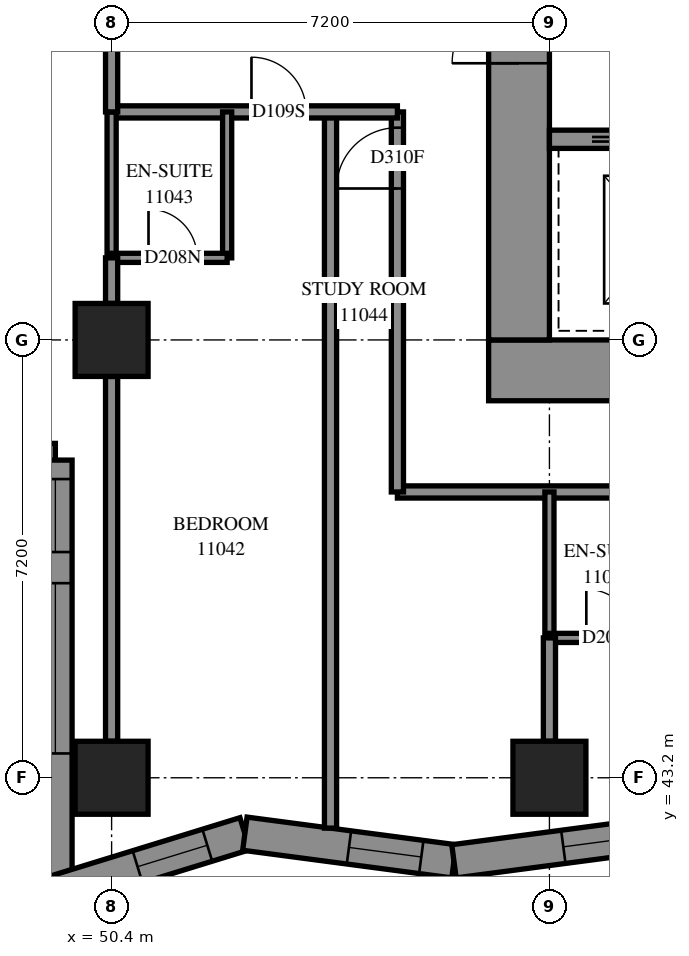
"""IFC4 building model, lengths in metres.
Left out: names, types, materials, properties, quantities, classifications, styles, units other than length and angle.
Written with IfcOpenShell. Run it as: python <this file> out.ifc"""

import sys

from ifc_helpers import new_model, si_unit, direction, frame, frame_2d, origin, origin_2d, place, context, subcontext, project, spatial, polyline, rectangle, outline, extrude, element, fill, save


model = new_model("IFC4")
c1 = context("Model", 3, precision=1e-05, world=origin(), true_north=direction((0.0, 1.0)))
c2 = subcontext(c1, "Body", "Model", "MODEL_VIEW")
j1 = project(units=[si_unit("LENGTHUNIT", "METRE"), si_unit("PLANEANGLEUNIT", "RADIAN")], contexts=[c1])
p1 = place(None, origin())
s1 = spatial("IfcSite", under=j1, at=p1, CompositionType="ELEMENT")
p2 = place(p1, origin())
s2 = spatial("IfcBuilding", under=s1, at=p2, CompositionType="ELEMENT")
p3 = place(p2, frame((0.0, 0.0, 44.0)))
s3 = spatial("IfcBuildingStorey", under=s2, at=p3, CompositionType="ELEMENT", Elevation=44.0)
for number, where, z_axis, x_axis in (
    (1, (50.4, 43.2, 0.0), (0.0, 0.0, 1.0), (1.0, 0.0, 0.0)),
    (2, (50.4, 50.4, 0.0), (0.0, 0.0, 1.0), (1.0, 0.0, 0.0)),
    (3, (57.6, 43.2, 0.0), (0.0, 0.0, 1.0), (1.0, 0.0, 0.0)),
):
    element("IfcColumn", number, at=place(p3, frame(where, z_axis=z_axis, x_axis=x_axis)), inside=s3, PredefinedType="COLUMN", context=c2, shape_type="SweptSolid", body=[
        extrude(rectangle(XDim=1.2, YDim=1.2, at=origin_2d()), origin(), (0.0, 0.0, 1.0), 3.1),
    ])
p4 = place(p3, frame((56.6, 49.9, -0.3), z_axis=(0.0, 0.0, 1.0), x_axis=(1.0, 0.0, 0.0)))
e4 = element("IfcWall", 4, at=p4, inside=s3, PredefinedType="SHEAR", context=c2, shape_type="SweptSolid", body=[
    extrude(rectangle(XDim=16.4, YDim=1.0, at=frame_2d((8.2, 0.0))), origin(), (0.0, 0.0, 1.0), 2.7),
])
p5 = place(p3, frame((57.1, 50.4, -0.3), z_axis=(0.0, 0.0, 1.0), x_axis=(0.0, 1.0, 0.0)))
e5 = element("IfcWall", 5, at=p5, inside=s3, PredefinedType="SHEAR", context=c2, shape_type="SweptSolid", body=[
    extrude(rectangle(XDim=14.4, YDim=1.0, at=frame_2d((7.2, 0.0))), origin(), (0.0, 0.0, 1.0), 2.7),
])
p6 = place(p5, frame((4.55, 0.0, 0.3)))
e6 = element("IfcOpeningElement", 6, at=p6, cuts=e5, PredefinedType="OPENING", context=c2, shape_type="SweptSolid", body=[
    extrude(rectangle(XDim=1.1, YDim=2.1, at=frame_2d((0.55, 1.05))), frame((0.0, 0.51, 0.0), z_axis=(0.0, -1.0, 0.0), x_axis=(1.0, 0.0, 0.0)), (0.0, 0.0, 1.0), 1.02),
])
p7 = place(p5, frame((11.35, 0.0, 0.3)))
e7 = element("IfcOpeningElement", 7, at=p7, cuts=e5, PredefinedType="OPENING", context=c2, shape_type="SweptSolid", body=[
    extrude(rectangle(XDim=1.1, YDim=2.1, at=frame_2d((0.55, 1.05))), frame((0.0, 0.51, 0.0), z_axis=(0.0, -1.0, 0.0), x_axis=(1.0, 0.0, 0.0)), (0.0, 0.0, 1.0), 1.02),
])
p8 = place(p3, frame((57.6, 53.7, 0.0), z_axis=(0.0, 0.0, 1.0), x_axis=(1.0, 0.0, 0.0)))
e8 = element("IfcWall", 8, at=p8, inside=s3, PredefinedType="SOLIDWALL", context=c2, shape_type="SweptSolid", body=[
    extrude(rectangle(XDim=14.4, YDim=0.3, at=frame_2d((7.2, 0.0))), origin(), (0.0, 0.0, 1.0), 3.1),
])
p9 = place(p8, frame((1.25, 0.0, 0.0)))
e9 = element("IfcOpeningElement", 9, at=p9, cuts=e8, PredefinedType="OPENING", context=c2, shape_type="SweptSolid", body=[
    extrude(rectangle(XDim=1.1, YDim=2.1, at=frame_2d((0.55, 1.05))), frame((0.0, 0.16, 0.0), z_axis=(0.0, -1.0, 0.0), x_axis=(1.0, 0.0, 0.0)), (0.0, 0.0, 1.0), 0.32),
])
p10 = place(p8, frame((4.85, 0.0, 0.0)))
e10 = element("IfcOpeningElement", 10, at=p10, cuts=e8, PredefinedType="OPENING", context=c2, shape_type="SweptSolid", body=[
    extrude(rectangle(XDim=1.1, YDim=2.1, at=frame_2d((0.55, 1.05))), frame((0.0, 0.16, 0.0), z_axis=(0.0, -1.0, 0.0), x_axis=(1.0, 0.0, 0.0)), (0.0, 0.0, 1.0), 0.32),
])
p11 = place(p8, frame((8.45, 0.0, 0.0)))
e11 = element("IfcOpeningElement", 11, at=p11, cuts=e8, PredefinedType="OPENING", context=c2, shape_type="SweptSolid", body=[
    extrude(rectangle(XDim=1.1, YDim=2.1, at=frame_2d((0.55, 1.05))), frame((0.0, 0.16, 0.0), z_axis=(0.0, -1.0, 0.0), x_axis=(1.0, 0.0, 0.0)), (0.0, 0.0, 1.0), 0.32),
])
p12 = place(p8, frame((12.05, 0.0, 0.0)))
e12 = element("IfcOpeningElement", 12, at=p12, cuts=e8, PredefinedType="OPENING", context=c2, shape_type="SweptSolid", body=[
    extrude(rectangle(XDim=1.1, YDim=2.1, at=frame_2d((0.55, 1.05))), frame((0.0, 0.16, 0.0), z_axis=(0.0, -1.0, 0.0), x_axis=(1.0, 0.0, 0.0)), (0.0, 0.0, 1.0), 0.32),
])
p13 = place(p3, frame((35.075, 48.424, 0.0), z_axis=(0.0, 0.0, 1.0), x_axis=(1.0, 0.0, 0.0)))
e13 = element("IfcWall", 13, at=p13, inside=s3, PredefinedType="SOLIDWALL", context=c2, shape_type="SweptSolid", body=[
    extrude(outline(polyline([(-0.275, -0.275), (14.125, -0.275), (14.675, 0.275), (0.275, 0.275), (-0.275, -0.275)])), origin(), (0.0, 0.0, 1.0), 3.1),
])
p14 = place(p13, frame((1.825, 0.0, 0.7)))
e14 = element("IfcOpeningElement", 14, at=p14, cuts=e13, PredefinedType="OPENING", context=c2, shape_type="SweptSolid", body=[
    extrude(rectangle(XDim=1.8, YDim=2.0, at=frame_2d((0.9, 1.0))), frame((0.0, 0.285, 0.0), z_axis=(0.0, -1.0, 0.0), x_axis=(1.0, 0.0, 0.0)), (0.0, 0.0, 1.0), 0.57),
])
p15 = place(p13, frame((5.425, 0.0, 0.7)))
e15 = element("IfcOpeningElement", 15, at=p15, cuts=e13, PredefinedType="OPENING", context=c2, shape_type="SweptSolid", body=[
    extrude(rectangle(XDim=1.8, YDim=2.0, at=frame_2d((0.9, 1.0))), frame((0.0, 0.285, 0.0), z_axis=(0.0, -1.0, 0.0), x_axis=(1.0, 0.0, 0.0)), (0.0, 0.0, 1.0), 0.57),
])
p16 = place(p13, frame((9.025, 0.0, 0.7)))
e16 = element("IfcOpeningElement", 16, at=p16, cuts=e13, PredefinedType="OPENING", context=c2, shape_type="SweptSolid", body=[
    extrude(rectangle(XDim=1.8, YDim=2.0, at=frame_2d((0.9, 1.0))), frame((0.0, 0.285, 0.0), z_axis=(0.0, -1.0, 0.0), x_axis=(1.0, 0.0, 0.0)), (0.0, 0.0, 1.0), 0.57),
])
p17 = place(p13, frame((12.062, 0.0, 0.7)))
e17 = element("IfcOpeningElement", 17, at=p17, cuts=e13, PredefinedType="OPENING", context=c2, shape_type="SweptSolid", body=[
    extrude(rectangle(XDim=1.8, YDim=2.0, at=frame_2d((0.9, 1.0))), frame((0.0, 0.285, 0.0), z_axis=(0.0, -1.0, 0.0), x_axis=(1.0, 0.0, 0.0)), (0.0, 0.0, 1.0), 0.57),
])
p18 = place(p3, frame((49.475, 48.424, 0.0), z_axis=(0.0, 0.0, 1.0), x_axis=(0.0, -1.0, 0.0)))
e18 = element("IfcWall", 18, at=p18, inside=s3, PredefinedType="SOLIDWALL", context=c2, shape_type="SweptSolid", body=[
    extrude(outline(polyline([(0.275, -0.275), (7.475, -0.275), (6.73, 0.275), (-0.275, 0.275), (0.275, -0.275)])), origin(), (0.0, 0.0, 1.0), 3.1),
])
p19 = place(p18, frame((2.024, 0.0, 0.5)))
e19 = element("IfcOpeningElement", 19, at=p19, cuts=e18, PredefinedType="OPENING", context=c2, shape_type="SweptSolid", body=[
    extrude(rectangle(XDim=2.8, YDim=2.45, at=frame_2d((1.4, 1.225))), frame((0.0, 0.285, 0.0), z_axis=(0.0, -1.0, 0.0), x_axis=(1.0, 0.0, 0.0)), (0.0, 0.0, 1.0), 0.57),
])
p20 = place(p18, frame((0.312, 0.0, 0.5)))
e20 = element("IfcOpeningElement", 20, at=p20, cuts=e18, PredefinedType="OPENING", context=c2, shape_type="SweptSolid", body=[
    extrude(rectangle(XDim=1.2, YDim=2.45, at=frame_2d((0.6, 1.225))), frame((0.0, 0.285, 0.0), z_axis=(0.0, -1.0, 0.0), x_axis=(1.0, 0.0, 0.0)), (0.0, 0.0, 1.0), 0.57),
])
p21 = place(p3, frame((49.475, 41.321, 0.0), z_axis=(0.0, 0.0, 1.0), x_axis=(0.9557664095, 0.2941267931, 0.0)))
e21 = element("IfcWall", 21, at=p21, inside=s3, PredefinedType="SOLIDWALL", context=c2, shape_type="SweptSolid", body=[
    extrude(outline(polyline([(-0.372, -0.275), (3.201, -0.275), (3.321, 0.275), (0.372, 0.275), (-0.372, -0.275)])), origin(), (0.0, 0.0, 1.0), 3.1),
])
p22 = place(p21, frame((1.414, 0.0, 0.5)))
e22 = element("IfcOpeningElement", 22, at=p22, cuts=e21, PredefinedType="OPENING", context=c2, shape_type="SweptSolid", body=[
    extrude(rectangle(XDim=1.2, YDim=2.45, at=frame_2d((0.6, 1.225))), frame((0.0, 0.285, 0.0), z_axis=(0.0, -1.0, 0.0), x_axis=(1.0, 0.0, 0.0)), (0.0, 0.0, 1.0), 0.57),
])
p23 = place(p3, frame((52.592, 42.281, 0.0), z_axis=(0.0, 0.0, 1.0), x_axis=(0.9913920636, -0.1309266064, 0.0)))
e23 = element("IfcWall", 23, at=p23, inside=s3, PredefinedType="SOLIDWALL", context=c2, shape_type="SweptSolid", body=[
    extrude(outline(polyline([(0.06, -0.275), (3.505, -0.275), (3.432, 0.275), (-0.06, 0.275), (0.06, -0.275)])), origin(), (0.0, 0.0, 1.0), 3.1),
])
p24 = place(p23, frame((1.726, 0.0, 0.5)))
e24 = element("IfcOpeningElement", 24, at=p24, cuts=e23, PredefinedType="OPENING", context=c2, shape_type="SweptSolid", body=[
    extrude(rectangle(XDim=1.2, YDim=2.45, at=frame_2d((0.6, 1.225))), frame((0.0, 0.285, 0.0), z_axis=(0.0, -1.0, 0.0), x_axis=(1.0, 0.0, 0.0)), (0.0, 0.0, 1.0), 0.57),
])
p25 = place(p3, frame((56.03, 41.826, 0.0), z_axis=(0.0, 0.0, 1.0), x_axis=(0.9913924297, 0.1309238341, 0.0)))
e25 = element("IfcWall", 25, at=p25, inside=s3, PredefinedType="SOLIDWALL", context=c2, shape_type="SweptSolid", body=[
    extrude(outline(polyline([(-0.036, -0.275), (3.408, -0.275), (3.481, 0.275), (0.036, 0.275), (-0.036, -0.275)])), origin(), (0.0, 0.0, 1.0), 3.1),
])
p26 = place(p25, frame((1.814, 0.0, 0.5)))
e26 = element("IfcOpeningElement", 26, at=p26, cuts=e25, PredefinedType="OPENING", context=c2, shape_type="SweptSolid", body=[
    extrude(rectangle(XDim=1.2, YDim=2.45, at=frame_2d((0.6, 1.225))), frame((0.0, 0.285, 0.0), z_axis=(0.0, -1.0, 0.0), x_axis=(1.0, 0.0, 0.0)), (0.0, 0.0, 1.0), 0.57),
])
p27 = place(p3, frame((55.1, 47.9, 0.0), z_axis=(0.0, 0.0, 1.0), x_axis=(1.0, 0.0, 0.0)))
e27 = element("IfcWall", 27, at=p27, inside=s3, PredefinedType="PARTITIONING", context=c2, shape_type="SweptSolid", body=[
    extrude(rectangle(XDim=19.204, YDim=0.2, at=frame_2d((9.602, 0.0))), origin(), (0.0, 0.0, 1.0), 3.1),
])
p28 = place(p27, frame((6.399, 0.0, 0.0)))
e28 = element("IfcOpeningElement", 28, at=p28, cuts=e27, PredefinedType="OPENING", context=c2, shape_type="SweptSolid", body=[
    extrude(rectangle(XDim=0.9, YDim=2.1, at=frame_2d((0.45, 1.05))), frame((0.0, 0.11, 0.0), z_axis=(0.0, -1.0, 0.0), x_axis=(1.0, 0.0, 0.0)), (0.0, 0.0, 1.0), 0.22),
])
p29 = place(p27, frame((13.599, 0.0, 0.0)))
e29 = element("IfcOpeningElement", 29, at=p29, cuts=e27, PredefinedType="OPENING", context=c2, shape_type="SweptSolid", body=[
    extrude(rectangle(XDim=0.9, YDim=2.1, at=frame_2d((0.45, 1.05))), frame((0.0, 0.11, 0.0), z_axis=(0.0, -1.0, 0.0), x_axis=(1.0, 0.0, 0.0)), (0.0, 0.0, 1.0), 0.22),
])
p30 = place(p3, frame((54.0, 42.372, 0.0), z_axis=(0.0, 0.0, 1.0), x_axis=(0.0, 1.0, 0.0)))
e30 = element("IfcWall", 30, at=p30, inside=s3, PredefinedType="PARTITIONING", context=c2, shape_type="SweptSolid", body=[
    extrude(rectangle(XDim=11.778, YDim=0.2, at=frame_2d((5.889, 0.0))), origin(), (0.0, 0.0, 1.0), 3.1),
])
p31 = place(p3, frame((55.1, 47.9, 0.0), z_axis=(0.0, 0.0, 1.0), x_axis=(0.0, 1.0, 0.0)))
e31 = element("IfcWall", 31, at=p31, inside=s3, PredefinedType="PARTITIONING", context=c2, shape_type="SweptSolid", body=[
    extrude(rectangle(XDim=6.25, YDim=0.2, at=frame_2d((3.125, 0.0))), origin(), (0.0, 0.0, 1.0), 3.1),
])
p32 = place(p31, frame((4.99, 0.0, 0.0)))
e32 = element("IfcOpeningElement", 32, at=p32, cuts=e31, PredefinedType="OPENING", context=c2, shape_type="SweptSolid", body=[
    extrude(rectangle(XDim=1.0, YDim=2.1, at=frame_2d((0.5, 1.05))), frame((0.0, 0.11, 0.0), z_axis=(0.0, -1.0, 0.0), x_axis=(1.0, 0.0, 0.0)), (0.0, 0.0, 1.0), 0.22),
])
p33 = place(p3, frame((50.4, 43.8, 0.0), z_axis=(0.0, 0.0, 1.0), x_axis=(0.0, 1.0, 0.0)))
e33 = element("IfcWall", 33, at=p33, inside=s3, PredefinedType="PARTITIONING", context=c2, shape_type="SweptSolid", body=[
    extrude(rectangle(XDim=6.0, YDim=0.2, at=frame_2d((3.0, 0.0))), origin(), (0.0, 0.0, 1.0), 2.6),
])
p34 = place(p3, frame((50.4, 54.15, 0.0), z_axis=(0.0, 0.0, 1.0), x_axis=(1.0, 0.0, 0.0)))
e34 = element("IfcWall", 34, at=p34, inside=s3, PredefinedType="PARTITIONING", context=c2, shape_type="SweptSolid", body=[
    extrude(rectangle(XDim=4.7, YDim=0.2, at=frame_2d((2.35, 0.0))), origin(), (0.0, 0.0, 1.0), 3.1),
])
p35 = place(p34, frame((2.3, 0.0, 0.0)))
e35 = element("IfcOpeningElement", 35, at=p35, cuts=e34, PredefinedType="OPENING", context=c2, shape_type="SweptSolid", body=[
    extrude(rectangle(XDim=0.9, YDim=2.1, at=frame_2d((0.45, 1.05))), frame((0.0, 0.11, 0.0), z_axis=(0.0, -1.0, 0.0), x_axis=(1.0, 0.0, 0.0)), (0.0, 0.0, 1.0), 0.22),
])
for number, where, z_axis, x_axis in (
    (36, (52.3, 51.75, 0.0), (0.0, 0.0, 1.0), (0.0, 1.0, 0.0)),
    (37, (50.4, 51.75, 0.0), (0.0, 0.0, 1.0), (0.0, 1.0, 0.0)),
    (38, (57.6, 45.5, 0.0), (0.0, 0.0, 1.0), (0.0, 1.0, 0.0)),
):
    element("IfcWall", number, at=place(p3, frame(where, z_axis=z_axis, x_axis=x_axis)), inside=s3, PredefinedType="PARTITIONING", context=c2, shape_type="SweptSolid", body=[
        extrude(rectangle(XDim=2.4, YDim=0.15, at=frame_2d((1.2, 0.0))), origin(), (0.0, 0.0, 1.0), 3.1),
    ])
p36 = place(p3, frame((50.4, 54.15, 0.0), z_axis=(0.0, 0.0, 1.0), x_axis=(0.0, 1.0, 0.0)))
e39 = element("IfcWall", 39, at=p36, inside=s3, PredefinedType="PARTITIONING", context=c2, shape_type="SweptSolid", body=[
    extrude(rectangle(XDim=2.1, YDim=0.2, at=frame_2d((1.05, 0.0))), origin(), (0.0, 0.0, 1.0), 3.1),
])
p37 = place(p3, frame((50.4, 51.75, 0.0), z_axis=(0.0, 0.0, 1.0), x_axis=(1.0, 0.0, 0.0)))
e40 = element("IfcWall", 40, at=p37, inside=s3, PredefinedType="PARTITIONING", context=c2, shape_type="SweptSolid", body=[
    extrude(rectangle(XDim=1.9, YDim=0.15, at=frame_2d((0.95, 0.0))), origin(), (0.0, 0.0, 1.0), 3.1),
])
p38 = place(p37, frame((0.607, 0.0, 0.0)))
e41 = element("IfcOpeningElement", 41, at=p38, cuts=e40, PredefinedType="OPENING", context=c2, shape_type="SweptSolid", body=[
    extrude(rectangle(XDim=0.8, YDim=2.1, at=frame_2d((0.4, 1.05))), frame((0.0, 0.085, 0.0), z_axis=(0.0, -1.0, 0.0), x_axis=(1.0, 0.0, 0.0)), (0.0, 0.0, 1.0), 0.17),
])
p39 = place(p3, frame((57.6, 45.5, 0.0), z_axis=(0.0, 0.0, 1.0), x_axis=(1.0, 0.0, 0.0)))
e42 = element("IfcWall", 42, at=p39, inside=s3, PredefinedType="PARTITIONING", context=c2, shape_type="SweptSolid", body=[
    extrude(rectangle(XDim=1.9, YDim=0.15, at=frame_2d((0.95, 0.0))), origin(), (0.0, 0.0, 1.0), 3.1),
])
p40 = place(p39, frame((0.607, 0.0, 0.0)))
e43 = element("IfcOpeningElement", 43, at=p40, cuts=e42, PredefinedType="OPENING", context=c2, shape_type="SweptSolid", body=[
    extrude(rectangle(XDim=0.8, YDim=2.1, at=frame_2d((0.4, 1.05))), frame((0.0, 0.085, 0.0), z_axis=(0.0, -1.0, 0.0), x_axis=(1.0, 0.0, 0.0)), (0.0, 0.0, 1.0), 0.17),
])
p41 = place(p3, frame((57.6, 43.8, 0.0), z_axis=(0.0, 0.0, 1.0), x_axis=(0.0, 1.0, 0.0)))
e44 = element("IfcWall", 44, at=p41, inside=s3, PredefinedType="PARTITIONING", context=c2, shape_type="SweptSolid", body=[
    extrude(rectangle(XDim=1.7, YDim=0.2, at=frame_2d((0.85, 0.0))), origin(), (0.0, 0.0, 1.0), 3.1),
])
p42 = place(p3, frame((50.4, 51.0, 0.0), z_axis=(0.0, 0.0, 1.0), x_axis=(0.0, 1.0, 0.0)))
e45 = element("IfcWall", 45, at=p42, inside=s3, PredefinedType="PARTITIONING", context=c2, shape_type="SweptSolid", body=[
    extrude(rectangle(XDim=0.75, YDim=0.2, at=frame_2d((0.375, 0.0))), origin(), (0.0, 0.0, 1.0), 3.1),
])
p43 = place(p19, origin())
e46 = element("IfcWindow", 46, at=p43, inside=s3, PartitioningType="SINGLE_PANEL", PredefinedType="WINDOW", context=c2, shape_type="SweptSolid", body=[
    extrude(rectangle(XDim=2.8, YDim=2.45, at=frame_2d((1.4, 1.225))), frame((0.0, 0.155, 0.0), z_axis=(0.0, -1.0, 0.0), x_axis=(1.0, 0.0, 0.0)), (0.0, 0.0, 1.0), 0.06),
])
fill(e19, e46)
p44 = place(p20, origin())
e47 = element("IfcWindow", 47, at=p44, inside=s3, PartitioningType="SINGLE_PANEL", PredefinedType="WINDOW", context=c2, shape_type="SweptSolid", body=[
    extrude(rectangle(XDim=1.2, YDim=2.45, at=frame_2d((0.6, 1.225))), frame((0.0, 0.155, 0.0), z_axis=(0.0, -1.0, 0.0), x_axis=(1.0, 0.0, 0.0)), (0.0, 0.0, 1.0), 0.06),
])
fill(e20, e47)
p45 = place(p22, origin())
e48 = element("IfcWindow", 48, at=p45, inside=s3, PartitioningType="SINGLE_PANEL", PredefinedType="WINDOW", context=c2, shape_type="SweptSolid", body=[
    extrude(rectangle(XDim=1.2, YDim=2.45, at=frame_2d((0.6, 1.225))), frame((0.0, 0.155, 0.0), z_axis=(0.0, -1.0, 0.0), x_axis=(1.0, 0.0, 0.0)), (0.0, 0.0, 1.0), 0.06),
])
fill(e22, e48)
p46 = place(p24, origin())
e49 = element("IfcWindow", 49, at=p46, inside=s3, PartitioningType="SINGLE_PANEL", PredefinedType="WINDOW", context=c2, shape_type="SweptSolid", body=[
    extrude(rectangle(XDim=1.2, YDim=2.45, at=frame_2d((0.6, 1.225))), frame((0.0, 0.155, 0.0), z_axis=(0.0, -1.0, 0.0), x_axis=(1.0, 0.0, 0.0)), (0.0, 0.0, 1.0), 0.06),
])
fill(e24, e49)
p47 = place(p26, origin())
e50 = element("IfcWindow", 50, at=p47, inside=s3, PartitioningType="SINGLE_PANEL", PredefinedType="WINDOW", context=c2, shape_type="SweptSolid", body=[
    extrude(rectangle(XDim=1.2, YDim=2.45, at=frame_2d((0.6, 1.225))), frame((0.0, 0.155, 0.0), z_axis=(0.0, -1.0, 0.0), x_axis=(1.0, 0.0, 0.0)), (0.0, 0.0, 1.0), 0.06),
])
fill(e26, e50)
p48 = place(p6, origin())
e51 = element("IfcDoor", 51, at=p48, inside=s3, OperationType="DOUBLE_DOOR_SINGLE_SWING", PredefinedType="DOOR", context=c2, shape_type="SweptSolid", body=[
    extrude(rectangle(XDim=1.1, YDim=2.1, at=frame_2d((0.55, 1.05))), frame((0.0, 0.025, 0.0), z_axis=(0.0, -1.0, 0.0), x_axis=(1.0, 0.0, 0.0)), (0.0, 0.0, 1.0), 0.05),
])
fill(e6, e51)
p49 = place(p35, origin())
e52 = element("IfcDoor", 52, at=p49, inside=s3, OperationType="SINGLE_SWING_LEFT", PredefinedType="DOOR", context=c2, shape_type="SweptSolid", body=[
    extrude(rectangle(XDim=0.9, YDim=2.1, at=frame_2d((0.45, 1.05))), frame((0.0, 0.025, 0.0), z_axis=(0.0, -1.0, 0.0), x_axis=(1.0, 0.0, 0.0)), (0.0, 0.0, 1.0), 0.05),
])
fill(e35, e52)
p50 = place(p38, origin())
e53 = element("IfcDoor", 53, at=p50, inside=s3, OperationType="SINGLE_SWING_RIGHT", PredefinedType="DOOR", context=c2, shape_type="SweptSolid", body=[
    extrude(rectangle(XDim=0.8, YDim=2.1, at=frame_2d((0.4, 1.05))), frame((0.0, 0.025, 0.0), z_axis=(0.0, -1.0, 0.0), x_axis=(1.0, 0.0, 0.0)), (0.0, 0.0, 1.0), 0.05),
])
fill(e41, e53)
p51 = place(p32, origin())
e54 = element("IfcDoor", 54, at=p51, inside=s3, OperationType="SINGLE_SWING_RIGHT", PredefinedType="DOOR", context=c2, shape_type="SweptSolid", body=[
    extrude(rectangle(XDim=1.0, YDim=2.1, at=frame_2d((0.5, 1.05))), frame((0.0, 0.025, 0.0), z_axis=(0.0, -1.0, 0.0), x_axis=(1.0, 0.0, 0.0)), (0.0, 0.0, 1.0), 0.05),
])
fill(e32, e54)
p52 = place(p40, origin())
e55 = element("IfcDoor", 55, at=p52, inside=s3, OperationType="SINGLE_SWING_RIGHT", PredefinedType="DOOR", context=c2, shape_type="SweptSolid", body=[
    extrude(rectangle(XDim=0.8, YDim=2.1, at=frame_2d((0.4, 1.05))), frame((0.0, 0.025, 0.0), z_axis=(0.0, -1.0, 0.0), x_axis=(1.0, 0.0, 0.0)), (0.0, 0.0, 1.0), 0.05),
])
fill(e43, e55)
save(model, sys.argv[1])
